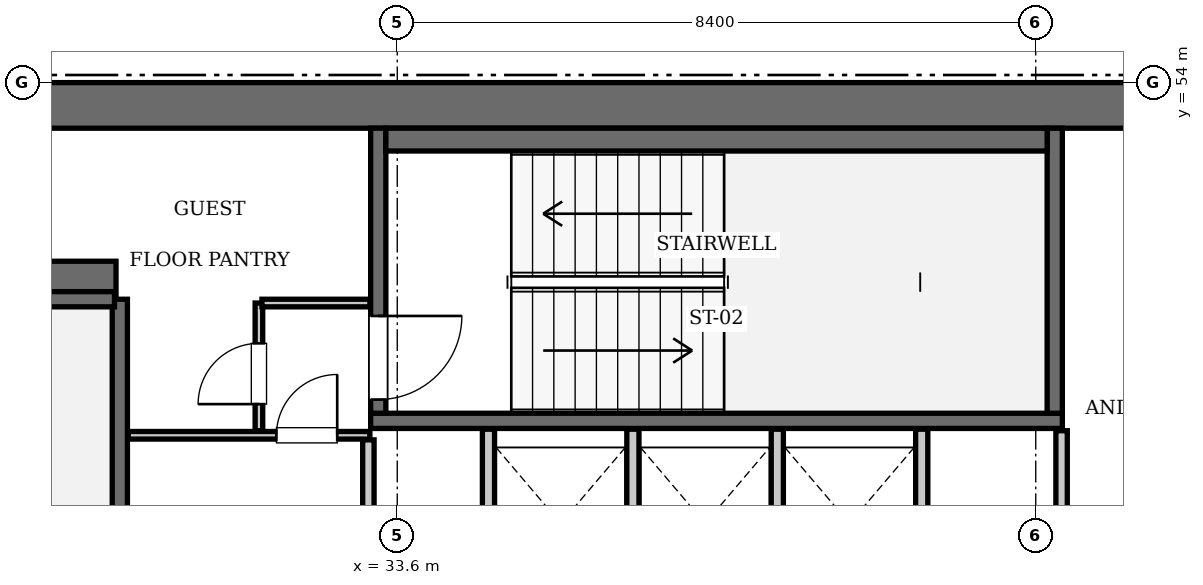
"""IFC4 building model, lengths in metres.
Left out: names, types, materials, properties, quantities, classifications, styles, units other than length and angle.
Written with IfcOpenShell. Run it as: python <this file> out.ifc"""

import sys

from ifc_helpers import new_model, si_unit, direction, frame, frame_2d, origin, place, context, subcontext, project, spatial, rectangle, extrude, element, fill, save


model = new_model("IFC4")
c1 = context("Model", 3, precision=1e-05, world=origin(), true_north=direction((0.0, 1.0)))
c2 = subcontext(c1, "Body", "Model", "MODEL_VIEW")
j1 = project(units=[si_unit("LENGTHUNIT", "METRE"), si_unit("PLANEANGLEUNIT", "RADIAN")], contexts=[c1])
p1 = place(None, origin())
s1 = spatial("IfcSite", under=j1, at=p1, CompositionType="ELEMENT")
p2 = place(p1, origin())
s2 = spatial("IfcBuilding", under=s1, at=p2, CompositionType="ELEMENT")
p3 = place(p2, frame((0.0, 0.0, 285.6)))
s3 = spatial("IfcBuildingStorey", under=s2, at=p3, CompositionType="ELEMENT", Elevation=285.6)
p4 = place(p3, frame((25.2, 53.7, 0.0), z_axis=(0.0, 0.0, 1.0), x_axis=(1.0, 0.0, 0.0)))
e1 = element("IfcWall", 1, at=p4, inside=s3, PredefinedType="SHEAR", context=c2, shape_type="SweptSolid", body=[
    extrude(rectangle(XDim=25.2, YDim=0.6, at=frame_2d((12.6, 0.0))), origin(), (0.0, 0.0, 1.0), 3.85),
])
p5 = place(p3, frame((25.8, 51.4, 0.0), z_axis=(0.0, 0.0, 1.0), x_axis=(1.0, 0.0, 0.0)))
e2 = element("IfcWall", 2, at=p5, inside=s3, PredefinedType="SHEAR", context=c2, shape_type="SweptSolid", body=[
    extrude(rectangle(XDim=4.1, YDim=0.5, at=frame_2d((2.05, 0.0))), origin(), (0.0, 0.0, 1.0), 3.85),
])
p6 = place(p3, frame((29.95, 42.0, 0.0), z_axis=(0.0, 0.0, 1.0), x_axis=(0.0, 1.0, 0.0)))
e3 = element("IfcWall", 3, at=p6, inside=s3, PredefinedType="SOLIDWALL", context=c2, shape_type="SweptSolid", body=[
    extrude(rectangle(XDim=9.15, YDim=0.2, at=frame_2d((4.575, 0.0))), origin(), (0.0, 0.0, 1.0), 3.61),
])
p7 = place(p3, frame((26.38, 51.15, 0.0), z_axis=(0.0, 0.0, 1.0), x_axis=(1.0, 0.0, 0.0)))
e4 = element("IfcWall", 4, at=p7, inside=s3, PredefinedType="SOLIDWALL", context=c2, shape_type="SweptSolid", body=[
    extrude(rectangle(XDim=3.5, YDim=0.2, at=frame_2d((1.75, 0.0))), origin(), (0.0, 0.0, 1.0), 3.61),
])
p8 = place(p3, frame((33.25, 49.55, 0.0), z_axis=(0.0, 0.0, 1.0), x_axis=(1.0, 0.0, 0.0)))
e5 = element("IfcWall", 5, at=p8, inside=s3, PredefinedType="SOLIDWALL", context=c2, shape_type="SweptSolid", body=[
    extrude(rectangle(XDim=9.1, YDim=0.2, at=frame_2d((4.55, 0.0))), origin(), (0.0, 0.0, 1.0), 3.61),
])
p9 = place(p3, frame((42.25, 49.65, 0.0), z_axis=(0.0, 0.0, 1.0), x_axis=(0.0, 1.0, 0.0)))
e6 = element("IfcWall", 6, at=p9, inside=s3, PredefinedType="SOLIDWALL", context=c2, shape_type="SweptSolid", body=[
    extrude(rectangle(XDim=3.75, YDim=0.2, at=frame_2d((1.875, 0.0))), origin(), (0.0, 0.0, 1.0), 3.61),
])
p10 = place(p3, frame((33.35, 49.65, 0.0), z_axis=(0.0, 0.0, 1.0), x_axis=(0.0, 1.0, 0.0)))
e7 = element("IfcWall", 7, at=p10, inside=s3, PredefinedType="SOLIDWALL", context=c2, shape_type="SweptSolid", body=[
    extrude(rectangle(XDim=3.75, YDim=0.2, at=frame_2d((1.875, 0.0))), origin(), (0.0, 0.0, 1.0), 3.61),
])
p11 = place(p10, frame((0.18, 0.0, 0.0)))
e8 = element("IfcOpeningElement", 8, at=p11, cuts=e7, PredefinedType="OPENING", context=c2, shape_type="SweptSolid", body=[
    extrude(rectangle(XDim=1.1, YDim=2.15, at=frame_2d((0.55, 1.075))), frame((0.0, 0.11, 0.0), z_axis=(0.0, -1.0, 0.0), x_axis=(1.0, 0.0, 0.0)), (0.0, 0.0, 1.0), 0.22),
])
p12 = place(p3, frame((33.45, 53.25, 0.0), z_axis=(0.0, 0.0, 1.0), x_axis=(1.0, 0.0, 0.0)))
e9 = element("IfcWall", 9, at=p12, inside=s3, PredefinedType="SOLIDWALL", context=c2, shape_type="SweptSolid", body=[
    extrude(rectangle(XDim=8.7, YDim=0.3, at=frame_2d((4.35, 0.0))), origin(), (0.0, 0.0, 1.0), 3.61),
])
for number, where, z_axis, x_axis in (
    (10, (34.8, 47.25, 0.0), (0.0, 0.0, 1.0), (0.0, 1.0, 0.0)),
    (11, (36.7, 47.25, 0.0), (0.0, 0.0, 1.0), (0.0, 1.0, 0.0)),
    (12, (38.6, 47.25, 0.0), (0.0, 0.0, 1.0), (0.0, 1.0, 0.0)),
    (13, (40.5, 47.25, 0.0), (0.0, 0.0, 1.0), (0.0, 1.0, 0.0)),
):
    element("IfcWall", number, at=place(p3, frame(where, z_axis=z_axis, x_axis=x_axis)), inside=s3, PredefinedType="SOLIDWALL", context=c2, shape_type="SweptSolid", body=[
        extrude(rectangle(XDim=2.19, YDim=0.16, at=frame_2d((1.095, 0.0))), origin(), (0.0, 0.0, 1.0), 3.61),
    ])
p13 = place(p3, frame((33.22, 45.14, 0.0), z_axis=(0.0, 0.0, 1.0), x_axis=(0.0, 1.0, 0.0)))
e14 = element("IfcWall", 14, at=p13, inside=s3, PredefinedType="PARTITIONING", context=c2, shape_type="SweptSolid", body=[
    extrude(rectangle(XDim=4.16, YDim=0.15, at=frame_2d((2.08, 0.0))), origin(), (0.0, 0.0, 1.0), 3.61),
])
p14 = place(p3, frame((30.06, 49.36, 0.0), z_axis=(0.0, 0.0, 1.0), x_axis=(1.0, 0.0, 0.0)))
e15 = element("IfcWall", 15, at=p14, inside=s3, PredefinedType="PARTITIONING", context=c2, shape_type="SweptSolid", body=[
    extrude(rectangle(XDim=3.18, YDim=0.1, at=frame_2d((1.59, 0.0))), origin(), (0.0, 0.0, 1.0), 3.61),
])
p15 = place(p14, frame((1.95, 0.0, 0.0)))
e16 = element("IfcOpeningElement", 16, at=p15, cuts=e15, PredefinedType="OPENING", context=c2, shape_type="SweptSolid", body=[
    extrude(rectangle(XDim=0.8, YDim=2.05, at=frame_2d((0.4, 1.025))), frame((0.0, 0.06, 0.0), z_axis=(0.0, -1.0, 0.0), x_axis=(1.0, 0.0, 0.0)), (0.0, 0.0, 1.0), 0.12),
])
p16 = place(p3, frame((31.78, 49.42, 0.0), z_axis=(0.0, 0.0, 1.0), x_axis=(0.0, 1.0, 0.0)))
e17 = element("IfcWall", 17, at=p16, inside=s3, PredefinedType="PARTITIONING", context=c2, shape_type="SweptSolid", body=[
    extrude(rectangle(XDim=1.68, YDim=0.1, at=frame_2d((0.84, 0.0))), origin(), (0.0, 0.0, 1.0), 3.61),
])
p17 = place(p16, frame((0.35, 0.0, 0.0)))
e18 = element("IfcOpeningElement", 18, at=p17, cuts=e17, PredefinedType="OPENING", context=c2, shape_type="SweptSolid", body=[
    extrude(rectangle(XDim=0.8, YDim=2.05, at=frame_2d((0.4, 1.025))), frame((0.0, 0.06, 0.0), z_axis=(0.0, -1.0, 0.0), x_axis=(1.0, 0.0, 0.0)), (0.0, 0.0, 1.0), 0.12),
])
p18 = place(p3, frame((31.82, 51.1, 0.0), z_axis=(0.0, 0.0, 1.0), x_axis=(1.0, 0.0, 0.0)))
e19 = element("IfcWall", 19, at=p18, inside=s3, PredefinedType="PARTITIONING", context=c2, shape_type="SweptSolid", body=[
    extrude(rectangle(XDim=1.42, YDim=0.1, at=frame_2d((0.71, 0.0))), origin(), (0.0, 0.0, 1.0), 3.61),
])
p19 = place(p3, frame((42.34, 46.96, 0.0), z_axis=(0.0, 0.0, 1.0), x_axis=(0.0, 1.0, 0.0)))
e20 = element("IfcWall", 20, at=p19, inside=s3, PredefinedType="PARTITIONING", context=c2, shape_type="SweptSolid", body=[
    extrude(rectangle(XDim=2.46, YDim=0.15, at=frame_2d((1.23, 0.0))), origin(), (0.0, 0.0, 1.0), 3.61),
])
p20 = place(p19, frame((0.24, 0.0, 0.0)))
e21 = element("IfcOpeningElement", 21, at=p20, cuts=e20, PredefinedType="OPENING", context=c2, shape_type="SweptSolid", body=[
    extrude(rectangle(XDim=0.8, YDim=2.05, at=frame_2d((0.4, 1.025))), frame((0.0, 0.085, 0.0), z_axis=(0.0, -1.0, 0.0), x_axis=(1.0, 0.0, 0.0)), (0.0, 0.0, 1.0), 0.17),
])
p21 = place(p11, frame((1.1, 0.0, 0.0), z_axis=(0.0, 0.0, 1.0), x_axis=(-1.0, 0.0, 0.0)))
e22 = element("IfcDoor", 22, at=p21, inside=s3, OperationType="SINGLE_SWING_LEFT", PredefinedType="DOOR", context=c2, shape_type="SweptSolid", body=[
    extrude(rectangle(XDim=1.1, YDim=2.15, at=frame_2d((0.55, 1.075))), frame((0.0, 0.025, 0.0), z_axis=(0.0, -1.0, 0.0), x_axis=(1.0, 0.0, 0.0)), (0.0, 0.0, 1.0), 0.05),
])
fill(e8, e22)
p22 = place(p15, origin())
e23 = element("IfcDoor", 23, at=p22, inside=s3, OperationType="SINGLE_SWING_RIGHT", PredefinedType="DOOR", context=c2, shape_type="SweptSolid", body=[
    extrude(rectangle(XDim=0.8, YDim=2.05, at=frame_2d((0.4, 1.025))), frame((0.0, 0.025, 0.0), z_axis=(0.0, -1.0, 0.0), x_axis=(1.0, 0.0, 0.0)), (0.0, 0.0, 1.0), 0.05),
])
fill(e16, e23)
p23 = place(p17, origin())
e24 = element("IfcDoor", 24, at=p23, inside=s3, OperationType="SINGLE_SWING_LEFT", PredefinedType="DOOR", context=c2, shape_type="SweptSolid", body=[
    extrude(rectangle(XDim=0.8, YDim=2.05, at=frame_2d((0.4, 1.025))), frame((0.0, 0.025, 0.0), z_axis=(0.0, -1.0, 0.0), x_axis=(1.0, 0.0, 0.0)), (0.0, 0.0, 1.0), 0.05),
])
fill(e18, e24)
save(model, sys.argv[1])
